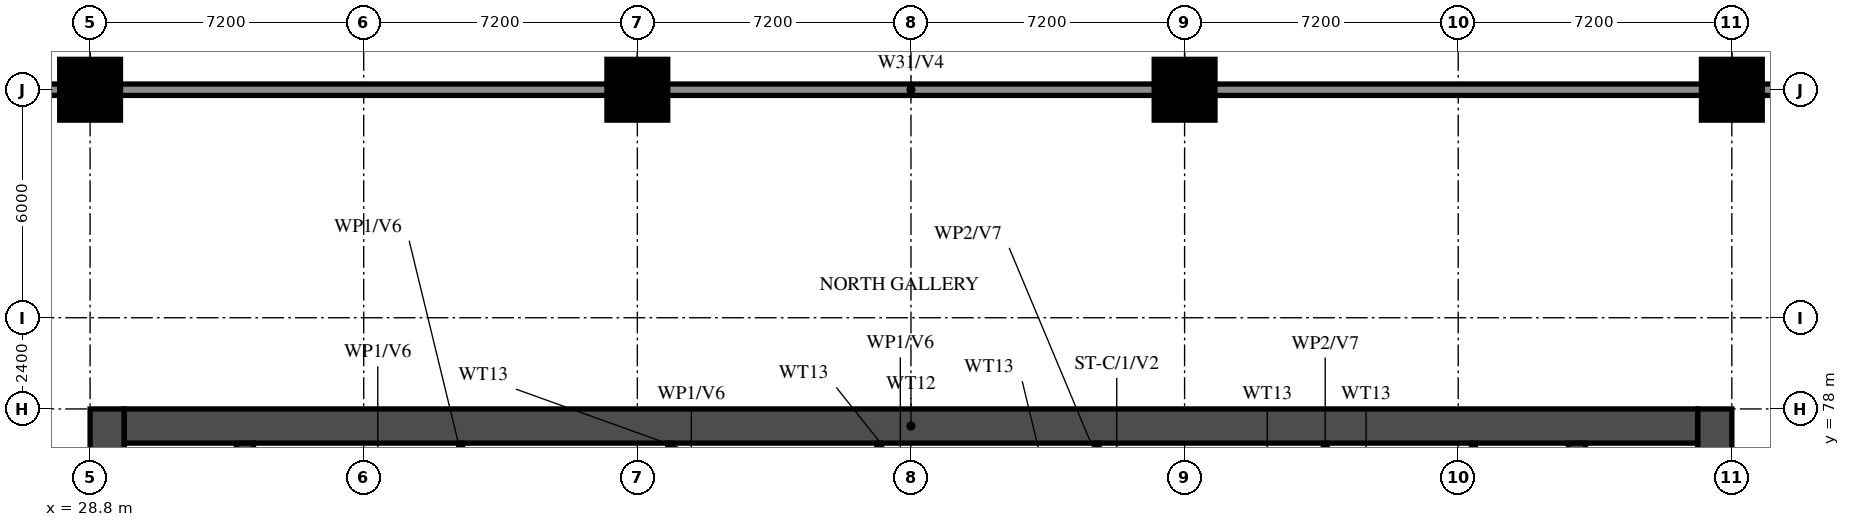
"""IFC4 building model, lengths in metres.
Left out: names, types, materials, properties, quantities, classifications, styles, units other than length and angle.
Written with IfcOpenShell. Run it as: python <this file> out.ifc"""

import sys

from ifc_helpers import new_model, si_unit, direction, frame, frame_2d, origin, origin_2d, place, context, subcontext, project, spatial, rectangle, circle, extrude, source, transform, mapped, element, save


model = new_model("IFC4")
c1 = context("Model", 3, precision=1e-05, world=origin(), true_north=direction((0.0, 1.0)))
c2 = subcontext(c1, "Body", "Model", "MODEL_VIEW")
j1 = project(units=[si_unit("LENGTHUNIT", "METRE"), si_unit("PLANEANGLEUNIT", "RADIAN")], contexts=[c1])
p1 = place(None, origin())
s1 = spatial("IfcSite", under=j1, at=p1, CompositionType="ELEMENT")
p2 = place(p1, origin())
s2 = spatial("IfcBuilding", under=s1, at=p2, CompositionType="ELEMENT")
p3 = place(p2, frame((0.0, 0.0, 7.8)))
s3 = spatial("IfcBuildingStorey", under=s2, at=p3, CompositionType="ELEMENT", Elevation=7.8)
m1 = source(origin(), c2, "Body", "SweptSolid", [
    extrude(circle(Radius=0.8, at=origin_2d()), origin(), (0.0, 0.0, 1.0), 5.0),
])
for number, where, z_axis, x_axis in (
    (1, (28.8, 86.4, 0.0), (0.0, 0.0, 1.0), (1.0, 0.0, 0.0)),
    (2, (43.2, 86.4, 0.0), (0.0, 0.0, 1.0), (1.0, 0.0, 0.0)),
    (3, (57.6, 86.4, 0.0), (0.0, 0.0, 1.0), (1.0, 0.0, 0.0)),
    (4, (72.0, 86.4, 0.0), (0.0, 0.0, 1.0), (1.0, 0.0, 0.0)),
):
    element("IfcColumn", number, at=place(p3, frame(where, z_axis=z_axis, x_axis=x_axis)), inside=s3, PredefinedType="COLUMN", context=c2, shape_type="MappedRepresentation", body=[
        mapped(m1, transform((0.0, 0.0, 0.0))),
    ])
for number, where, z_axis, x_axis in (
    (5, (29.25, 66.0, 0.0), (0.0, 0.0, 1.0), (0.0, 1.0, 0.0)),
    (6, (71.55, 66.0, 0.0), (0.0, 0.0, 1.0), (0.0, 1.0, 0.0)),
):
    element("IfcWall", number, at=place(p3, frame(where, z_axis=z_axis, x_axis=x_axis)), inside=s3, PredefinedType="SHEAR", context=c2, shape_type="SweptSolid", body=[
        extrude(rectangle(XDim=12.0, YDim=0.9, at=frame_2d((6.0, 0.0))), origin(), (0.0, 0.0, 1.0), 5.0),
    ])
p4 = place(p3, frame((29.7, 77.55, 0.0), z_axis=(0.0, 0.0, 1.0), x_axis=(1.0, 0.0, 0.0)))
e7 = element("IfcWall", 7, at=p4, inside=s3, PredefinedType="SHEAR", context=c2, shape_type="SweptSolid", body=[
    extrude(rectangle(XDim=41.4, YDim=0.9, at=frame_2d((20.7, 0.0))), origin(), (0.0, 0.0, 1.0), 5.0),
])
p5 = place(p3, frame((32.875, 66.45, 0.0), z_axis=(0.0, 0.0, 1.0), x_axis=(0.0, 1.0, 0.0)))
e8 = element("IfcWall", 8, at=p5, inside=s3, PredefinedType="SHEAR", context=c2, shape_type="SweptSolid", body=[
    extrude(rectangle(XDim=10.65, YDim=0.45, at=frame_2d((5.325, 0.0))), origin(), (0.0, 0.0, 1.0), 5.0),
])
p6 = place(p3, frame((67.925, 66.45, 0.0), z_axis=(0.0, 0.0, 1.0), x_axis=(0.0, 1.0, 0.0)))
e9 = element("IfcWall", 9, at=p6, inside=s3, PredefinedType="SHEAR", context=c2, shape_type="SweptSolid", body=[
    extrude(rectangle(XDim=10.65, YDim=0.45, at=frame_2d((5.325, 0.0))), origin(), (0.0, 0.0, 1.0), 5.0),
])
p7 = place(p6, frame((0.15, 0.0, 0.0)))
e10 = element("IfcOpeningElement", 10, at=p7, cuts=e9, PredefinedType="OPENING", context=c2, shape_type="SweptSolid", body=[
    extrude(rectangle(XDim=1.1, YDim=2.1, at=frame_2d((0.55, 1.05))), frame((0.0, 0.235, 0.0), z_axis=(0.0, -1.0, 0.0), x_axis=(1.0, 0.0, 0.0)), (0.0, 0.0, 1.0), 0.47),
])
for number, where, z_axis, x_axis in (
    (11, (38.55, 76.325, 0.0), (0.0, 0.0, 1.0), (0.0, 1.0, 0.0)),
    (12, (44.05, 76.325, 0.0), (0.0, 0.0, 1.0), (0.0, 1.0, 0.0)),
    (13, (49.55, 76.325, 0.0), (0.0, 0.0, 1.0), (0.0, 1.0, 0.0)),
    (14, (55.3, 76.325, 0.0), (0.0, 0.0, 1.0), (0.0, 1.0, 0.0)),
    (15, (61.3, 76.325, 0.0), (0.0, 0.0, 1.0), (0.0, 1.0, 0.0)),
    (16, (65.2, 76.325, 0.0), (0.0, 0.0, 1.0), (0.0, 1.0, 0.0)),
):
    element("IfcWall", number, at=place(p3, frame(where, z_axis=z_axis, x_axis=x_axis)), inside=s3, PredefinedType="PARTITIONING", context=c2, shape_type="SweptSolid", body=[
        extrude(rectangle(XDim=0.775, YDim=0.1, at=frame_2d((0.388, 0.0))), origin(), (0.0, 0.0, 1.0), 5.0),
    ])
p8 = place(p3, frame((0.0, 86.4, 0.0), z_axis=(0.0, 0.0, 1.0), x_axis=(1.0, 0.0, 0.0)))
e17 = element("IfcWall", 17, at=p8, inside=s3, PredefinedType="SOLIDWALL", context=c2, shape_type="SweptSolid", body=[
    extrude(rectangle(XDim=100.8, YDim=0.3, at=frame_2d((50.4, 0.0))), origin(), (0.0, 0.0, 1.0), 5.0),
])
p9 = place(p8, frame((2.4, 0.0, 0.6)))
e18 = element("IfcOpeningElement", 18, at=p9, cuts=e17, PredefinedType="OPENING", context=c2, shape_type="SweptSolid", body=[
    extrude(rectangle(XDim=1.8, YDim=2.4, at=frame_2d((0.9, 1.2))), frame((0.0, 0.16, 0.0), z_axis=(0.0, -1.0, 0.0), x_axis=(1.0, 0.0, 0.0)), (0.0, 0.0, 1.0), 0.32),
])
p10 = place(p8, frame((6.0, 0.0, 0.6)))
e19 = element("IfcOpeningElement", 19, at=p10, cuts=e17, PredefinedType="OPENING", context=c2, shape_type="SweptSolid", body=[
    extrude(rectangle(XDim=1.8, YDim=2.4, at=frame_2d((0.9, 1.2))), frame((0.0, 0.16, 0.0), z_axis=(0.0, -1.0, 0.0), x_axis=(1.0, 0.0, 0.0)), (0.0, 0.0, 1.0), 0.32),
])
p11 = place(p8, frame((9.6, 0.0, 0.6)))
e20 = element("IfcOpeningElement", 20, at=p11, cuts=e17, PredefinedType="OPENING", context=c2, shape_type="SweptSolid", body=[
    extrude(rectangle(XDim=1.8, YDim=2.4, at=frame_2d((0.9, 1.2))), frame((0.0, 0.16, 0.0), z_axis=(0.0, -1.0, 0.0), x_axis=(1.0, 0.0, 0.0)), (0.0, 0.0, 1.0), 0.32),
])
p12 = place(p8, frame((16.8, 0.0, 0.6)))
e21 = element("IfcOpeningElement", 21, at=p12, cuts=e17, PredefinedType="OPENING", context=c2, shape_type="SweptSolid", body=[
    extrude(rectangle(XDim=1.8, YDim=2.4, at=frame_2d((0.9, 1.2))), frame((0.0, 0.16, 0.0), z_axis=(0.0, -1.0, 0.0), x_axis=(1.0, 0.0, 0.0)), (0.0, 0.0, 1.0), 0.32),
])
p13 = place(p8, frame((20.4, 0.0, 0.6)))
e22 = element("IfcOpeningElement", 22, at=p13, cuts=e17, PredefinedType="OPENING", context=c2, shape_type="SweptSolid", body=[
    extrude(rectangle(XDim=1.8, YDim=2.4, at=frame_2d((0.9, 1.2))), frame((0.0, 0.16, 0.0), z_axis=(0.0, -1.0, 0.0), x_axis=(1.0, 0.0, 0.0)), (0.0, 0.0, 1.0), 0.32),
])
p14 = place(p8, frame((78.0, 0.0, 0.6)))
e23 = element("IfcOpeningElement", 23, at=p14, cuts=e17, PredefinedType="OPENING", context=c2, shape_type="SweptSolid", body=[
    extrude(rectangle(XDim=1.8, YDim=2.4, at=frame_2d((0.9, 1.2))), frame((0.0, 0.16, 0.0), z_axis=(0.0, -1.0, 0.0), x_axis=(1.0, 0.0, 0.0)), (0.0, 0.0, 1.0), 0.32),
])
p15 = place(p8, frame((81.6, 0.0, 0.6)))
e24 = element("IfcOpeningElement", 24, at=p15, cuts=e17, PredefinedType="OPENING", context=c2, shape_type="SweptSolid", body=[
    extrude(rectangle(XDim=1.8, YDim=2.4, at=frame_2d((0.9, 1.2))), frame((0.0, 0.16, 0.0), z_axis=(0.0, -1.0, 0.0), x_axis=(1.0, 0.0, 0.0)), (0.0, 0.0, 1.0), 0.32),
])
p16 = place(p8, frame((88.8, 0.0, 0.6)))
e25 = element("IfcOpeningElement", 25, at=p16, cuts=e17, PredefinedType="OPENING", context=c2, shape_type="SweptSolid", body=[
    extrude(rectangle(XDim=1.8, YDim=2.4, at=frame_2d((0.9, 1.2))), frame((0.0, 0.16, 0.0), z_axis=(0.0, -1.0, 0.0), x_axis=(1.0, 0.0, 0.0)), (0.0, 0.0, 1.0), 0.32),
])
p17 = place(p8, frame((92.4, 0.0, 0.6)))
e26 = element("IfcOpeningElement", 26, at=p17, cuts=e17, PredefinedType="OPENING", context=c2, shape_type="SweptSolid", body=[
    extrude(rectangle(XDim=1.8, YDim=2.4, at=frame_2d((0.9, 1.2))), frame((0.0, 0.16, 0.0), z_axis=(0.0, -1.0, 0.0), x_axis=(1.0, 0.0, 0.0)), (0.0, 0.0, 1.0), 0.32),
])
p18 = place(p8, frame((96.0, 0.0, 0.6)))
e27 = element("IfcOpeningElement", 27, at=p18, cuts=e17, PredefinedType="OPENING", context=c2, shape_type="SweptSolid", body=[
    extrude(rectangle(XDim=1.8, YDim=2.4, at=frame_2d((0.9, 1.2))), frame((0.0, 0.16, 0.0), z_axis=(0.0, -1.0, 0.0), x_axis=(1.0, 0.0, 0.0)), (0.0, 0.0, 1.0), 0.32),
])
save(model, sys.argv[1])
